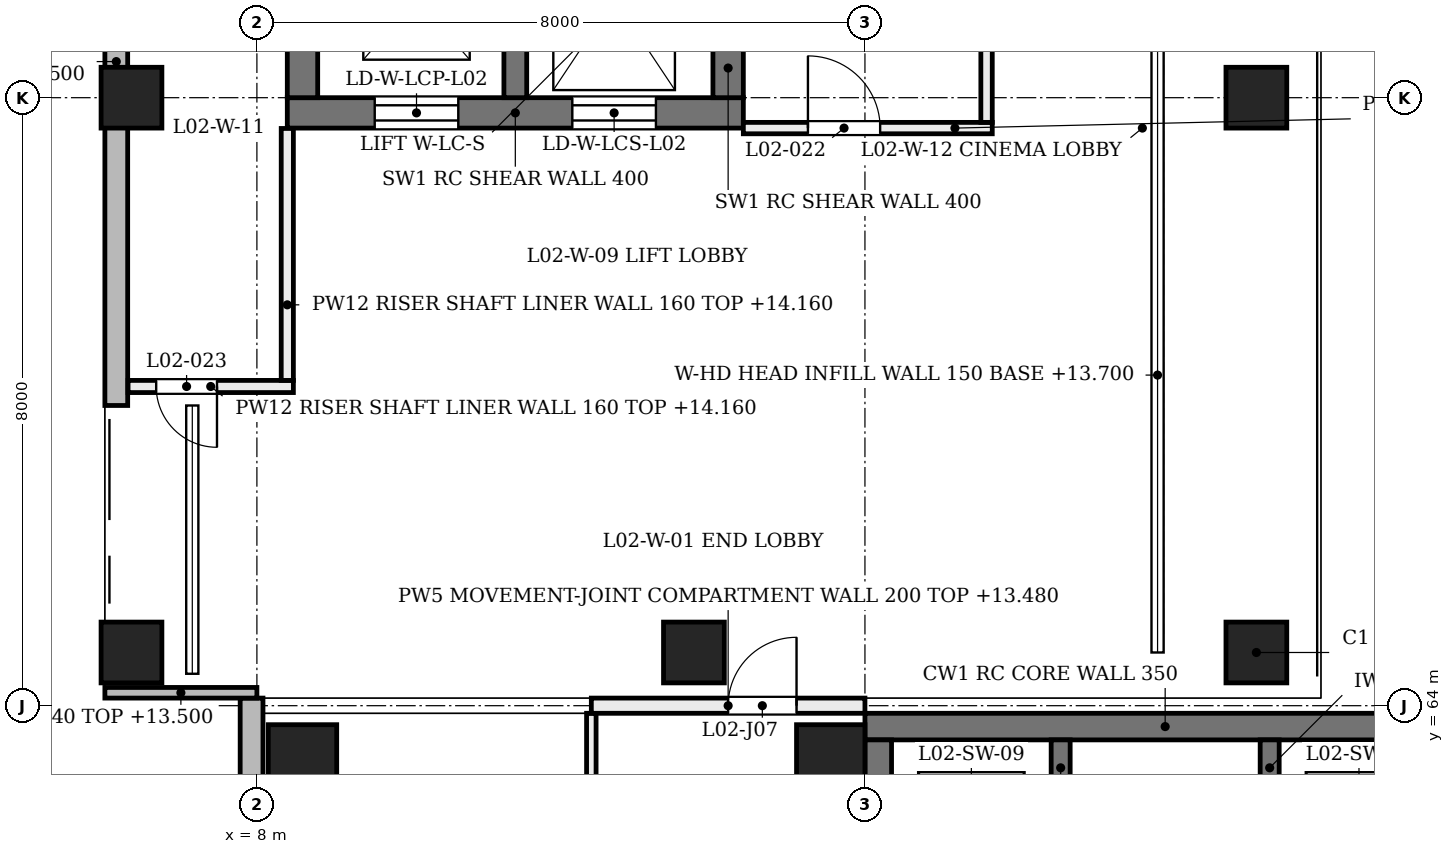
"""IFC4 building model, lengths in metres.
Left out: names, types, materials, properties, quantities, classifications, styles, units other than length and angle.
Written with IfcOpenShell. Run it as: python <this file> out.ifc"""

import sys

from ifc_helpers import new_model, si_unit, direction, frame, frame_2d, origin, origin_2d, place, context, subcontext, project, spatial, rectangle, extrude, element, fill, save


model = new_model("IFC4")
c1 = context("Model", 3, precision=1e-05, world=origin(), true_north=direction((0.0, 1.0)))
c2 = subcontext(c1, "Body", "Model", "MODEL_VIEW")
j1 = project(units=[si_unit("LENGTHUNIT", "METRE"), si_unit("PLANEANGLEUNIT", "RADIAN")], contexts=[c1])
p1 = place(None, origin())
s1 = spatial("IfcSite", under=j1, at=p1, CompositionType="ELEMENT")
p2 = place(p1, origin())
s2 = spatial("IfcBuilding", under=s1, at=p2, CompositionType="ELEMENT")
p3 = place(p2, frame((0.0, 0.0, 9.6)))
s3 = spatial("IfcBuildingStorey", under=s2, at=p3, CompositionType="ELEMENT", Elevation=9.6)
p4 = place(p3, frame((8.4, 71.8, 0.0), z_axis=(0.0, 0.0, 1.0), x_axis=(1.0, 0.0, 0.0)))
e1 = element("IfcWall", 1, at=p4, inside=s3, PredefinedType="SHEAR", context=c2, shape_type="SweptSolid", body=[
    extrude(rectangle(XDim=6.0, YDim=0.4, at=frame_2d((3.0, 0.0))), origin(), (0.0, 0.0, 1.0), 4.58),
])
p5 = place(p4, frame((1.15, 0.0, 0.0)))
e2 = element("IfcOpeningElement", 2, at=p5, cuts=e1, PredefinedType="OPENING", context=c2, shape_type="SweptSolid", body=[
    extrude(rectangle(XDim=1.1, YDim=2.1, at=frame_2d((0.55, 1.05))), frame((0.0, 0.21, 0.0), z_axis=(0.0, -1.0, 0.0), x_axis=(1.0, 0.0, 0.0)), (0.0, 0.0, 1.0), 0.42),
])
p6 = place(p4, frame((3.75, 0.0, 0.0)))
e3 = element("IfcOpeningElement", 3, at=p6, cuts=e1, PredefinedType="OPENING", context=c2, shape_type="SweptSolid", body=[
    extrude(rectangle(XDim=1.1, YDim=2.1, at=frame_2d((0.55, 1.05))), frame((0.0, 0.21, 0.0), z_axis=(0.0, -1.0, 0.0), x_axis=(1.0, 0.0, 0.0)), (0.0, 0.0, 1.0), 0.42),
])
for number, where, z_axis, x_axis in (
    (4, (8.6, 72.0, 0.0), (0.0, 0.0, 1.0), (0.0, 1.0, 0.0)),
    (5, (14.2, 72.0, 0.0), (0.0, 0.0, 1.0), (0.0, 1.0, 0.0)),
):
    element("IfcWall", number, at=place(p3, frame(where, z_axis=z_axis, x_axis=x_axis)), inside=s3, PredefinedType="SHEAR", context=c2, shape_type="SweptSolid", body=[
        extrude(rectangle(XDim=2.6, YDim=0.4, at=frame_2d((1.3, 0.0))), origin(), (0.0, 0.0, 1.0), 4.58),
    ])
p7 = place(p3, frame((11.4, 72.0, 0.0), z_axis=(0.0, 0.0, 1.0), x_axis=(0.0, 1.0, 0.0)))
e6 = element("IfcWall", 6, at=p7, inside=s3, PredefinedType="SHEAR", context=c2, shape_type="SweptSolid", body=[
    extrude(rectangle(XDim=2.6, YDim=0.3, at=frame_2d((1.3, 0.0))), origin(), (0.0, 0.0, 1.0), 4.58),
])
p8 = place(p3, frame((16.0, 63.725, 0.0), z_axis=(0.0, 0.0, 1.0), x_axis=(1.0, 0.0, 0.0)))
e7 = element("IfcWall", 7, at=p8, inside=s3, PredefinedType="SHEAR", context=c2, shape_type="SweptSolid", body=[
    extrude(rectangle(XDim=7.9, YDim=0.35, at=frame_2d((3.95, 0.0))), origin(), (0.0, 0.0, 1.0), 4.58),
])
p9 = place(p3, frame((16.175, 48.35, 0.0), z_axis=(0.0, 0.0, 1.0), x_axis=(0.0, 1.0, 0.0)))
e8 = element("IfcWall", 8, at=p9, inside=s3, PredefinedType="SHEAR", context=c2, shape_type="SweptSolid", body=[
    extrude(rectangle(XDim=15.2, YDim=0.35, at=frame_2d((7.6, 0.0))), origin(), (0.0, 0.0, 1.0), 4.58),
])
p10 = place(p9, frame((0.95, 0.0, 0.0)))
e9 = element("IfcOpeningElement", 9, at=p10, cuts=e8, PredefinedType="OPENING", context=c2, shape_type="SweptSolid", body=[
    extrude(rectangle(XDim=1.0, YDim=2.1, at=frame_2d((0.5, 1.05))), frame((0.0, 0.185, 0.0), z_axis=(0.0, -1.0, 0.0), x_axis=(1.0, 0.0, 0.0)), (0.0, 0.0, 1.0), 0.37),
])
p11 = place(p9, frame((10.6, 0.0, 0.0)))
e10 = element("IfcOpeningElement", 10, at=p11, cuts=e8, PredefinedType="OPENING", context=c2, shape_type="SweptSolid", body=[
    extrude(rectangle(XDim=1.4, YDim=2.1, at=frame_2d((0.7, 1.05))), frame((0.0, 0.185, 0.0), z_axis=(0.0, -1.0, 0.0), x_axis=(1.0, 0.0, 0.0)), (0.0, 0.0, 1.0), 0.37),
])
for number, where, z_axis, x_axis in (
    (11, (8.6, 63.3, 0.0), (0.0, 0.0, 1.0), (1.0, 0.0, 0.0)),
    (12, (15.55, 63.3, 0.0), (0.0, 0.0, 1.0), (1.0, 0.0, 0.0)),
):
    element("IfcColumn", number, at=place(p3, frame(where, z_axis=z_axis, x_axis=x_axis)), inside=s3, PredefinedType="COLUMN", context=c2, shape_type="SweptSolid", body=[
        extrude(rectangle(XDim=0.9, YDim=0.9, at=origin_2d()), origin(), (0.0, 0.0, 1.0), 4.8),
    ])
for number, where, z_axis, x_axis in (
    (13, (6.6, 64.7, 0.0), (-0.204, 0.0, 0.979), (0.0, -1.0, 0.0)),
    (14, (6.6, 72.0, 0.0), (-0.204, 0.0, 0.979), (0.0, -1.0, 0.0)),
    (15, (14.0, 64.7, 0.0), (-0.204, 0.0, 0.979), (0.0, -1.0, 0.0)),
    (16, (21.4, 64.7, 0.0), (-0.204, 0.0, 0.979), (0.0, -1.0, 0.0)),
    (17, (21.4, 72.0, 0.0), (-0.204, 0.0, 0.979), (0.0, -1.0, 0.0)),
):
    element("IfcColumn", number, at=place(p3, frame(where, z_axis=z_axis, x_axis=x_axis)), inside=s3, PredefinedType="COLUMN", context=c2, shape_type="SweptSolid", body=[
        extrude(rectangle(XDim=0.8, YDim=0.8, at=origin_2d()), origin(), (0.0, 0.0, 1.0), 4.903),
    ])
p12 = place(p3, frame((6.15, 67.95, 0.0), z_axis=(0.0, 0.0, 1.0), x_axis=(0.0, 1.0, 0.0)))
e18 = element("IfcWall", 18, at=p12, inside=s3, PredefinedType="SOLIDWALL", context=c2, shape_type="SweptSolid", body=[
    extrude(rectangle(XDim=24.1, YDim=0.3, at=frame_2d((12.05, 0.0))), origin(), (0.0, 0.0, 1.0), 3.9),
])
p13 = place(p3, frame((19.85, 64.9, 4.1), z_axis=(0.0, 0.0, 1.0), x_axis=(0.0, 1.0, 0.0)))
e19 = element("IfcWall", 19, at=p13, inside=s3, PredefinedType="SOLIDWALL", context=c2, shape_type="SweptSolid", body=[
    extrude(rectangle(XDim=6.9, YDim=0.15, at=frame_2d((3.45, 0.0))), origin(), (0.0, 0.0, 1.0), 0.48),
])
p14 = place(p3, frame((19.85, 72.2, 4.1), z_axis=(0.0, 0.0, 1.0), x_axis=(0.0, 1.0, 0.0)))
e20 = element("IfcWall", 20, at=p14, inside=s3, PredefinedType="SOLIDWALL", context=c2, shape_type="SweptSolid", body=[
    extrude(rectangle(XDim=7.6, YDim=0.15, at=frame_2d((3.8, 0.0))), origin(), (0.0, 0.0, 1.0), 0.48),
])
p15 = place(p3, frame((7.93, 47.7, 0.0), z_axis=(0.0, 0.0, 1.0), x_axis=(0.0, 1.0, 0.0)))
e21 = element("IfcWall", 21, at=p15, inside=s3, PredefinedType="SOLIDWALL", context=c2, shape_type="SweptSolid", body=[
    extrude(rectangle(XDim=16.4, YDim=0.3, at=frame_2d((8.2, 0.0))), origin(), (0.0, 0.0, 1.0), 3.9),
])
p16 = place(p15, frame((0.9, 0.0, 0.75)))
e22 = element("IfcOpeningElement", 22, at=p16, cuts=e21, PredefinedType="OPENING", context=c2, shape_type="SweptSolid", body=[
    extrude(rectangle(XDim=0.9, YDim=3.1, at=frame_2d((0.45, 1.55))), frame((0.0, 0.16, 0.0), z_axis=(0.0, -1.0, 0.0), x_axis=(1.0, 0.0, 0.0)), (0.0, 0.0, 1.0), 0.32),
])
p17 = place(p15, frame((3.6, 0.0, 0.75)))
e23 = element("IfcOpeningElement", 23, at=p17, cuts=e21, PredefinedType="OPENING", context=c2, shape_type="SweptSolid", body=[
    extrude(rectangle(XDim=0.9, YDim=3.1, at=frame_2d((0.45, 1.55))), frame((0.0, 0.16, 0.0), z_axis=(0.0, -1.0, 0.0), x_axis=(1.0, 0.0, 0.0)), (0.0, 0.0, 1.0), 0.32),
])
p18 = place(p15, frame((6.3, 0.0, 0.75)))
e24 = element("IfcOpeningElement", 24, at=p18, cuts=e21, PredefinedType="OPENING", context=c2, shape_type="SweptSolid", body=[
    extrude(rectangle(XDim=0.9, YDim=3.1, at=frame_2d((0.45, 1.55))), frame((0.0, 0.16, 0.0), z_axis=(0.0, -1.0, 0.0), x_axis=(1.0, 0.0, 0.0)), (0.0, 0.0, 1.0), 0.32),
])
p19 = place(p15, frame((9.0, 0.0, 0.75)))
e25 = element("IfcOpeningElement", 25, at=p19, cuts=e21, PredefinedType="OPENING", context=c2, shape_type="SweptSolid", body=[
    extrude(rectangle(XDim=0.9, YDim=3.1, at=frame_2d((0.45, 1.55))), frame((0.0, 0.16, 0.0), z_axis=(0.0, -1.0, 0.0), x_axis=(1.0, 0.0, 0.0)), (0.0, 0.0, 1.0), 0.32),
])
p20 = place(p15, frame((11.7, 0.0, 0.75)))
e26 = element("IfcOpeningElement", 26, at=p20, cuts=e21, PredefinedType="OPENING", context=c2, shape_type="SweptSolid", body=[
    extrude(rectangle(XDim=0.9, YDim=3.1, at=frame_2d((0.45, 1.55))), frame((0.0, 0.16, 0.0), z_axis=(0.0, -1.0, 0.0), x_axis=(1.0, 0.0, 0.0)), (0.0, 0.0, 1.0), 0.32),
])
p21 = place(p15, frame((14.4, 0.0, 0.75)))
e27 = element("IfcOpeningElement", 27, at=p21, cuts=e21, PredefinedType="OPENING", context=c2, shape_type="SweptSolid", body=[
    extrude(rectangle(XDim=0.9, YDim=3.1, at=frame_2d((0.45, 1.55))), frame((0.0, 0.16, 0.0), z_axis=(0.0, -1.0, 0.0), x_axis=(1.0, 0.0, 0.0)), (0.0, 0.0, 1.0), 0.32),
])
p22 = place(p3, frame((6.0, 64.17, 0.0), z_axis=(0.0, 0.0, 1.0), x_axis=(1.0, 0.0, 0.0)))
e28 = element("IfcWall", 28, at=p22, inside=s3, PredefinedType="SOLIDWALL", context=c2, shape_type="SweptSolid", body=[
    extrude(rectangle(XDim=2.0, YDim=0.14, at=frame_2d((1.0, 0.0))), origin(), (0.0, 0.0, 1.0), 3.9),
])
for number, where, z_axis, x_axis in (
    (29, (18.575, 61.1, 0.0), (0.0, 0.0, 1.0), (0.0, 1.0, 0.0)),
    (30, (21.325, 61.1, 0.0), (0.0, 0.0, 1.0), (0.0, 1.0, 0.0)),
):
    element("IfcWall", number, at=place(p3, frame(where, z_axis=z_axis, x_axis=x_axis)), inside=s3, PredefinedType="SOLIDWALL", context=c2, shape_type="SweptSolid", body=[
        extrude(rectangle(XDim=2.45, YDim=0.25, at=frame_2d((1.225, 0.0))), origin(), (0.0, 0.0, 1.0), 4.55),
    ])
p23 = place(p3, frame((6.305, 68.2, 0.0), z_axis=(0.0, 0.0, 1.0), x_axis=(1.0, 0.0, 0.0)))
e31 = element("IfcWall", 31, at=p23, inside=s3, PredefinedType="PARTITIONING", context=c2, shape_type="SweptSolid", body=[
    extrude(rectangle(XDim=2.175, YDim=0.16, at=frame_2d((1.087, 0.0))), origin(), (0.0, 0.0, 1.0), 4.56),
])
p24 = place(p23, frame((0.37, 0.0, 0.0)))
e32 = element("IfcOpeningElement", 32, at=p24, cuts=e31, PredefinedType="OPENING", context=c2, shape_type="SweptSolid", body=[
    extrude(rectangle(XDim=0.8, YDim=2.1, at=frame_2d((0.4, 1.05))), frame((0.0, 0.09, 0.0), z_axis=(0.0, -1.0, 0.0), x_axis=(1.0, 0.0, 0.0)), (0.0, 0.0, 1.0), 0.18),
])
p25 = place(p3, frame((8.4, 68.28, 0.0), z_axis=(0.0, 0.0, 1.0), x_axis=(0.0, 1.0, 0.0)))
e33 = element("IfcWall", 33, at=p25, inside=s3, PredefinedType="PARTITIONING", context=c2, shape_type="SweptSolid", body=[
    extrude(rectangle(XDim=3.315, YDim=0.16, at=frame_2d((1.657, 0.0))), origin(), (0.0, 0.0, 1.0), 4.56),
])
p26 = place(p3, frame((14.4, 71.6, 0.0), z_axis=(0.0, 0.0, 1.0), x_axis=(1.0, 0.0, 0.0)))
e34 = element("IfcWall", 34, at=p26, inside=s3, PredefinedType="PARTITIONING", context=c2, shape_type="SweptSolid", body=[
    extrude(rectangle(XDim=3.275, YDim=0.15, at=frame_2d((1.638, 0.0))), origin(), (0.0, 0.0, 1.0), 4.56),
])
p27 = place(p26, frame((0.85, 0.0, 0.0)))
e35 = element("IfcOpeningElement", 35, at=p27, cuts=e34, PredefinedType="OPENING", context=c2, shape_type="SweptSolid", body=[
    extrude(rectangle(XDim=0.95, YDim=2.1, at=frame_2d((0.475, 1.05))), frame((0.0, 0.085, 0.0), z_axis=(0.0, -1.0, 0.0), x_axis=(1.0, 0.0, 0.0)), (0.0, 0.0, 1.0), 0.17),
])
p28 = place(p3, frame((17.6, 71.675, 0.0), z_axis=(0.0, 0.0, 1.0), x_axis=(0.0, 1.0, 0.0)))
e36 = element("IfcWall", 36, at=p28, inside=s3, PredefinedType="PARTITIONING", context=c2, shape_type="SweptSolid", body=[
    extrude(rectangle(XDim=3.725, YDim=0.15, at=frame_2d((1.862, 0.0))), origin(), (0.0, 0.0, 1.0), 3.98),
])
p29 = place(p3, frame((12.4, 53.605, 0.0), z_axis=(0.0, 0.0, 1.0), x_axis=(0.0, 1.0, 0.0)))
e37 = element("IfcWall", 37, at=p29, inside=s3, PredefinedType="PARTITIONING", context=c2, shape_type="SweptSolid", body=[
    extrude(rectangle(XDim=10.295, YDim=0.125, at=frame_2d((5.147, 0.0))), origin(), (0.0, 0.0, 1.0), 3.88),
])
p30 = place(p29, frame((7.745, 0.0, 0.0)))
e38 = element("IfcOpeningElement", 38, at=p30, cuts=e37, PredefinedType="OPENING", context=c2, shape_type="SweptSolid", body=[
    extrude(rectangle(XDim=1.0, YDim=2.1, at=frame_2d((0.5, 1.05))), frame((0.0, 0.073, 0.0), z_axis=(0.0, -1.0, 0.0), x_axis=(1.0, 0.0, 0.0)), (0.0, 0.0, 1.0), 0.145),
])
p31 = place(p3, frame((12.4, 64.0, 0.0), z_axis=(0.0, 0.0, 1.0), x_axis=(1.0, 0.0, 0.0)))
e39 = element("IfcWall", 39, at=p31, inside=s3, PredefinedType="PARTITIONING", context=c2, shape_type="SweptSolid", body=[
    extrude(rectangle(XDim=3.6, YDim=0.2, at=frame_2d((1.8, 0.0))), origin(), (0.0, 0.0, 1.0), 3.88),
])
p32 = place(p31, frame((1.8, 0.0, 0.0)))
e40 = element("IfcOpeningElement", 40, at=p32, cuts=e39, PredefinedType="OPENING", context=c2, shape_type="SweptSolid", body=[
    extrude(rectangle(XDim=0.9, YDim=2.1, at=frame_2d((0.45, 1.05))), frame((0.0, 0.11, 0.0), z_axis=(0.0, -1.0, 0.0), x_axis=(1.0, 0.0, 0.0)), (0.0, 0.0, 1.0), 0.22),
])
p33 = place(p5, frame((1.1, 0.0, 0.0), z_axis=(0.0, 0.0, 1.0), x_axis=(-1.0, 0.0, 0.0)))
e41 = element("IfcDoor", 41, at=p33, inside=s3, OperationType="DOUBLE_DOOR_SLIDING", PredefinedType="DOOR", context=c2, shape_type="SweptSolid", body=[
    extrude(rectangle(XDim=1.1, YDim=2.1, at=frame_2d((0.55, 1.05))), frame((0.0, 0.025, 0.0), z_axis=(0.0, -1.0, 0.0), x_axis=(1.0, 0.0, 0.0)), (0.0, 0.0, 1.0), 0.05),
])
fill(e2, e41)
p34 = place(p6, frame((1.1, 0.0, 0.0), z_axis=(0.0, 0.0, 1.0), x_axis=(-1.0, 0.0, 0.0)))
e42 = element("IfcDoor", 42, at=p34, inside=s3, OperationType="DOUBLE_DOOR_SLIDING", PredefinedType="DOOR", context=c2, shape_type="SweptSolid", body=[
    extrude(rectangle(XDim=1.1, YDim=2.1, at=frame_2d((0.55, 1.05))), frame((0.0, 0.025, 0.0), z_axis=(0.0, -1.0, 0.0), x_axis=(1.0, 0.0, 0.0)), (0.0, 0.0, 1.0), 0.05),
])
fill(e3, e42)
p35 = place(p27, origin())
e43 = element("IfcDoor", 43, at=p35, inside=s3, OperationType="SINGLE_SWING_LEFT", PredefinedType="DOOR", context=c2, shape_type="SweptSolid", body=[
    extrude(rectangle(XDim=0.95, YDim=2.1, at=frame_2d((0.475, 1.05))), frame((0.0, 0.025, 0.0), z_axis=(0.0, -1.0, 0.0), x_axis=(1.0, 0.0, 0.0)), (0.0, 0.0, 1.0), 0.05),
])
fill(e35, e43)
p36 = place(p24, origin())
e44 = element("IfcDoor", 44, at=p36, inside=s3, OperationType="SINGLE_SWING_RIGHT", PredefinedType="DOOR", context=c2, shape_type="SweptSolid", body=[
    extrude(rectangle(XDim=0.8, YDim=2.1, at=frame_2d((0.4, 1.05))), frame((0.0, 0.025, 0.0), z_axis=(0.0, -1.0, 0.0), x_axis=(1.0, 0.0, 0.0)), (0.0, 0.0, 1.0), 0.05),
])
fill(e32, e44)
p37 = place(p32, frame((0.9, 0.0, 0.0), z_axis=(0.0, 0.0, 1.0), x_axis=(-1.0, 0.0, 0.0)))
e45 = element("IfcDoor", 45, at=p37, inside=s3, OperationType="SINGLE_SWING_RIGHT", PredefinedType="DOOR", context=c2, shape_type="SweptSolid", body=[
    extrude(rectangle(XDim=0.9, YDim=2.1, at=frame_2d((0.45, 1.05))), frame((0.0, 0.025, 0.0), z_axis=(0.0, -1.0, 0.0), x_axis=(1.0, 0.0, 0.0)), (0.0, 0.0, 1.0), 0.05),
])
fill(e40, e45)
save(model, sys.argv[1])
